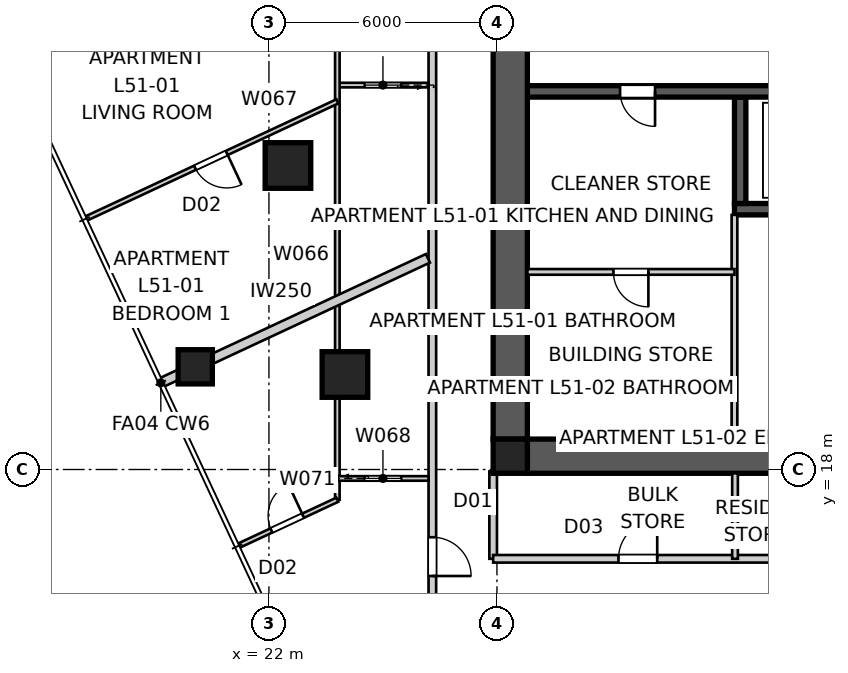
"""IFC4 building model, lengths in metres.
Left out: names, types, materials, properties, quantities, classifications, styles, units other than length and angle.
Written with IfcOpenShell. Run it as: python <this file> out.ifc"""

import sys

from ifc_helpers import new_model, si_unit, direction, frame, frame_2d, origin, origin_2d, place, context, subcontext, project, spatial, polyline, rectangle, outline, extrude, element, fill, save


model = new_model("IFC4")
c1 = context("Model", 3, precision=1e-05, world=origin(), true_north=direction((0.0, 1.0)))
c2 = subcontext(c1, "Body", "Model", "MODEL_VIEW")
j1 = project(units=[si_unit("LENGTHUNIT", "METRE"), si_unit("PLANEANGLEUNIT", "RADIAN")], contexts=[c1])
p1 = place(None, origin())
s1 = spatial("IfcSite", under=j1, at=p1, CompositionType="ELEMENT")
p2 = place(p1, origin())
s2 = spatial("IfcBuilding", under=s1, at=p2, CompositionType="ELEMENT")
p3 = place(p2, frame((0.0, 0.0, 186.2)))
s3 = spatial("IfcBuildingStorey", under=s2, at=p3, CompositionType="ELEMENT", Elevation=186.2)
p4 = place(p3, frame((51.2, 18.35, 0.0), z_axis=(0.0, 0.0, 1.0), x_axis=(-1.0, 0.0, 0.0)))
e1 = element("IfcWall", 1, at=p4, inside=s3, PredefinedType="SHEAR", context=c2, shape_type="SweptSolid", body=[
    extrude(outline(polyline([(0.0, -0.45), (22.4, -0.45), (22.4, -0.025), (22.85, -0.025), (22.85, 0.025), (22.4, 0.025), (22.4, 0.45), (0.0, 0.45), (0.0, 0.025), (-0.45, 0.025), (-0.45, -0.025), (0.0, -0.025), (0.0, -0.45)])), origin(), (0.0, 0.0, 1.0), 3.4),
])
p5 = place(p3, frame((28.35, 41.2, 0.0), z_axis=(0.0, 0.0, 1.0), x_axis=(0.0, -1.0, 0.0)))
e2 = element("IfcWall", 2, at=p5, inside=s3, PredefinedType="SHEAR", context=c2, shape_type="SweptSolid", body=[
    extrude(outline(polyline([(0.0, -0.45), (22.4, -0.45), (22.4, -0.025), (22.85, -0.025), (22.85, 0.025), (22.4, 0.025), (22.4, 0.45), (0.0, 0.45), (0.0, 0.025), (-0.45, 0.025), (-0.45, -0.025), (0.0, -0.025), (0.0, -0.45)])), origin(), (0.0, 0.0, 1.0), 3.4),
])
p6 = place(p5, frame((11.14, 0.0, 0.0)))
e3 = element("IfcOpeningElement", 3, at=p6, cuts=e2, PredefinedType="OPENING", context=c2, shape_type="SweptSolid", body=[
    extrude(rectangle(XDim=1.02, YDim=2.4, at=frame_2d((0.51, 1.2))), frame((0.0, 0.46, 0.0), z_axis=(0.0, -1.0, 0.0), x_axis=(1.0, 0.0, 0.0)), (0.0, 0.0, 1.0), 0.92),
])
p7 = place(p3, frame((51.2, 27.95, 0.0), z_axis=(0.0, 0.0, 1.0), x_axis=(-1.0, 0.0, 0.0)))
e4 = element("IfcWall", 4, at=p7, inside=s3, PredefinedType="SHEAR", context=c2, shape_type="SweptSolid", body=[
    extrude(rectangle(XDim=22.4, YDim=0.3, at=frame_2d((11.2, 0.0))), origin(), (0.0, 0.0, 1.0), 3.4),
])
p8 = place(p7, frame((19.04, 0.0, 0.0)))
e5 = element("IfcOpeningElement", 5, at=p8, cuts=e4, PredefinedType="OPENING", context=c2, shape_type="SweptSolid", body=[
    extrude(rectangle(XDim=0.92, YDim=2.1, at=frame_2d((0.46, 1.05))), frame((0.0, 0.16, 0.0), z_axis=(0.0, -1.0, 0.0), x_axis=(1.0, 0.0, 0.0)), (0.0, 0.0, 1.0), 0.32),
])
p9 = place(p7, frame((1.265, 0.0, 0.0)))
e6 = element("IfcOpeningElement", 6, at=p9, cuts=e4, PredefinedType="OPENING", context=c2, shape_type="SweptSolid", body=[
    extrude(rectangle(XDim=1.02, YDim=2.1, at=frame_2d((0.51, 1.05))), frame((0.0, 0.16, 0.0), z_axis=(0.0, -1.0, 0.0), x_axis=(1.0, 0.0, 0.0)), (0.0, 0.0, 1.0), 0.32),
])
p10 = place(p7, frame((4.015, 0.0, 0.0)))
e7 = element("IfcOpeningElement", 7, at=p10, cuts=e4, PredefinedType="OPENING", context=c2, shape_type="SweptSolid", body=[
    extrude(rectangle(XDim=0.92, YDim=2.1, at=frame_2d((0.46, 1.05))), frame((0.0, 0.16, 0.0), z_axis=(0.0, -1.0, 0.0), x_axis=(1.0, 0.0, 0.0)), (0.0, 0.0, 1.0), 0.32),
])
p11 = place(p7, frame((6.45, 0.0, 0.0)))
e8 = element("IfcOpeningElement", 8, at=p11, cuts=e4, PredefinedType="OPENING", context=c2, shape_type="SweptSolid", body=[
    extrude(rectangle(XDim=1.1, YDim=2.1, at=frame_2d((0.55, 1.05))), frame((0.0, 0.16, 0.0), z_axis=(0.0, -1.0, 0.0), x_axis=(1.0, 0.0, 0.0)), (0.0, 0.0, 1.0), 0.32),
])
p12 = place(p7, frame((9.25, 0.0, 0.0)))
e9 = element("IfcOpeningElement", 9, at=p12, cuts=e4, PredefinedType="OPENING", context=c2, shape_type="SweptSolid", body=[
    extrude(rectangle(XDim=1.1, YDim=2.1, at=frame_2d((0.55, 1.05))), frame((0.0, 0.16, 0.0), z_axis=(0.0, -1.0, 0.0), x_axis=(1.0, 0.0, 0.0)), (0.0, 0.0, 1.0), 0.32),
])
p13 = place(p7, frame((14.85, 0.0, 0.0)))
e10 = element("IfcOpeningElement", 10, at=p13, cuts=e4, PredefinedType="OPENING", context=c2, shape_type="SweptSolid", body=[
    extrude(rectangle(XDim=1.1, YDim=2.1, at=frame_2d((0.55, 1.05))), frame((0.0, 0.16, 0.0), z_axis=(0.0, -1.0, 0.0), x_axis=(1.0, 0.0, 0.0)), (0.0, 0.0, 1.0), 0.32),
])
p14 = place(p3, frame((45.75, 24.85, 0.0), z_axis=(0.0, 0.0, 1.0), x_axis=(-1.0, 0.0, 0.0)))
e11 = element("IfcWall", 11, at=p14, inside=s3, PredefinedType="SHEAR", context=c2, shape_type="SweptSolid", body=[
    extrude(rectangle(XDim=11.5, YDim=0.3, at=frame_2d((5.75, 0.0))), origin(), (0.0, 0.0, 1.0), 3.4),
])
p15 = place(p3, frame((34.4, 27.8, 0.0), z_axis=(0.0, 0.0, 1.0), x_axis=(0.0, -1.0, 0.0)))
e12 = element("IfcWall", 12, at=p15, inside=s3, PredefinedType="SHEAR", context=c2, shape_type="SweptSolid", body=[
    extrude(rectangle(XDim=2.8, YDim=0.3, at=frame_2d((1.4, 0.0))), origin(), (0.0, 0.0, 1.0), 3.4),
])
for number, where, z_axis, x_axis in (
    (13, (28.35, 18.35, 0.0), (0.0, 0.0, 1.0), (1.0, 0.0, 0.0)),
    (14, (20.061, 20.702, 0.0), (0.0, 0.0, 1.0), (1.0, 0.0, 0.0)),
):
    element("IfcColumn", number, at=place(p3, frame(where, z_axis=z_axis, x_axis=x_axis)), inside=s3, PredefinedType="COLUMN", context=c2, shape_type="SweptSolid", body=[
        extrude(rectangle(XDim=0.9, YDim=0.9, at=origin_2d()), origin(), (0.0, 0.0, 1.0), 3.4),
    ])
for number, where, z_axis, x_axis in (
    (15, (22.5, 26.0, 0.0), (0.0, 0.0, 1.0), (1.0, 0.0, 0.0)),
    (16, (24.0, 20.5, 0.0), (0.0, 0.0, 1.0), (1.0, 0.0, 0.0)),
):
    element("IfcColumn", number, at=place(p3, frame(where, z_axis=z_axis, x_axis=x_axis)), inside=s3, PredefinedType="COLUMN", context=c2, shape_type="SweptSolid", body=[
        extrude(rectangle(XDim=1.2, YDim=1.2, at=origin_2d()), origin(), (0.0, 0.0, 1.0), 3.4),
    ])
p16 = place(p3, frame((26.3, 47.1, 0.0), z_axis=(0.0, 0.0, 1.0), x_axis=(0.0, -1.0, 0.0)))
e17 = element("IfcWall", 17, at=p16, inside=s3, PredefinedType="PARTITIONING", context=c2, shape_type="SweptSolid", body=[
    extrude(rectangle(XDim=33.8, YDim=0.2, at=frame_2d((16.9, 0.0))), origin(), (0.0, 0.0, 1.0), 3.25),
])
p17 = place(p16, frame((15.449, 0.0, 0.0)))
e18 = element("IfcOpeningElement", 18, at=p17, cuts=e17, PredefinedType="OPENING", context=c2, shape_type="SweptSolid", body=[
    extrude(rectangle(XDim=1.02, YDim=2.34, at=frame_2d((0.51, 1.17))), frame((0.0, 0.11, 0.0), z_axis=(0.0, -1.0, 0.0), x_axis=(1.0, 0.0, 0.0)), (0.0, 0.0, 1.0), 0.22),
])
p18 = place(p16, frame((30.883, 0.0, 0.0)))
e19 = element("IfcOpeningElement", 19, at=p18, cuts=e17, PredefinedType="OPENING", context=c2, shape_type="SweptSolid", body=[
    extrude(rectangle(XDim=1.02, YDim=2.34, at=frame_2d((0.51, 1.17))), frame((0.0, 0.11, 0.0), z_axis=(0.0, -1.0, 0.0), x_axis=(1.0, 0.0, 0.0)), (0.0, 0.0, 1.0), 0.22),
])
p19 = place(p3, frame((19.155, 20.28, 0.0), z_axis=(0.0, 0.0, 1.0), x_axis=(0.906308569177, 0.422616584432, 0.0)))
e20 = element("IfcWall", 20, at=p19, inside=s3, PredefinedType="PARTITIONING", context=c2, shape_type="SweptSolid", body=[
    extrude(rectangle(XDim=7.755, YDim=0.25, at=frame_2d((3.877, 0.0))), origin(), (0.0, 0.0, 1.0), 3.25),
])
p20 = place(p3, frame((15.14, 28.89, 0.0), z_axis=(0.0, 0.0, 1.0), x_axis=(0.906303906082, 0.422626584374, 0.0)))
e21 = element("IfcWall", 21, at=p20, inside=s3, PredefinedType="PARTITIONING", context=c2, shape_type="SweptSolid", body=[
    extrude(rectangle(XDim=12.185, YDim=0.25, at=frame_2d((6.092, 0.0))), origin(), (0.0, 0.0, 1.0), 3.25),
])
p21 = place(p3, frame((34.25, 18.8, 0.0), z_axis=(0.0, 0.0, 1.0), x_axis=(0.0, 1.0, 0.0)))
e22 = element("IfcWall", 22, at=p21, inside=s3, PredefinedType="SOLIDWALL", context=c2, shape_type="SweptSolid", body=[
    extrude(rectangle(XDim=5.9, YDim=0.15, at=frame_2d((2.95, 0.0))), origin(), (0.0, 0.0, 1.0), 3.25),
])
p22 = place(p3, frame((34.25, 23.2, 0.0), z_axis=(0.0, 0.0, 1.0), x_axis=(-1.0, 0.0, 0.0)))
e23 = element("IfcWall", 23, at=p22, inside=s3, PredefinedType="SOLIDWALL", context=c2, shape_type="SweptSolid", body=[
    extrude(rectangle(XDim=5.45, YDim=0.15, at=frame_2d((2.725, 0.0))), origin(), (0.0, 0.0, 1.0), 3.25),
])
p23 = place(p22, frame((2.265, 0.0, 0.0)))
e24 = element("IfcOpeningElement", 24, at=p23, cuts=e23, PredefinedType="OPENING", context=c2, shape_type="SweptSolid", body=[
    extrude(rectangle(XDim=0.92, YDim=2.1, at=frame_2d((0.46, 1.05))), frame((0.0, 0.085, 0.0), z_axis=(0.0, -1.0, 0.0), x_axis=(1.0, 0.0, 0.0)), (0.0, 0.0, 1.0), 0.17),
])
p24 = place(p3, frame((27.9, 17.95, 0.0), z_axis=(0.0, 0.0, 1.0), x_axis=(0.0, -1.0, 0.0)))
e25 = element("IfcWall", 25, at=p24, inside=s3, PredefinedType="PARTITIONING", context=c2, shape_type="SweptSolid", body=[
    extrude(rectangle(XDim=2.3, YDim=0.2, at=frame_2d((1.15, 0.0))), origin(), (0.0, 0.0, 1.0), 3.25),
])
p25 = place(p3, frame((27.9, 15.65, 0.0), z_axis=(0.0, 0.0, 1.0), x_axis=(1.0, 0.0, 0.0)))
e26 = element("IfcWall", 26, at=p25, inside=s3, PredefinedType="PARTITIONING", context=c2, shape_type="SweptSolid", body=[
    extrude(rectangle(XDim=24.2, YDim=0.2, at=frame_2d((12.1, 0.0))), origin(), (0.0, 0.0, 1.0), 3.25),
])
p26 = place(p25, frame((10.743, 0.0, 0.0)))
e27 = element("IfcOpeningElement", 27, at=p26, cuts=e26, PredefinedType="OPENING", context=c2, shape_type="SweptSolid", body=[
    extrude(rectangle(XDim=1.02, YDim=2.1, at=frame_2d((0.51, 1.05))), frame((0.0, 0.11, 0.0), z_axis=(0.0, -1.0, 0.0), x_axis=(1.0, 0.0, 0.0)), (0.0, 0.0, 1.0), 0.22),
])
p27 = place(p25, frame((19.636, 0.0, 0.0)))
e28 = element("IfcOpeningElement", 28, at=p27, cuts=e26, PredefinedType="OPENING", context=c2, shape_type="SweptSolid", body=[
    extrude(rectangle(XDim=1.02, YDim=2.1, at=frame_2d((0.51, 1.05))), frame((0.0, 0.11, 0.0), z_axis=(0.0, -1.0, 0.0), x_axis=(1.0, 0.0, 0.0)), (0.0, 0.0, 1.0), 0.22),
])
p28 = place(p25, frame((3.297, 0.0, 0.0)))
e29 = element("IfcOpeningElement", 29, at=p28, cuts=e26, PredefinedType="OPENING", context=c2, shape_type="SweptSolid", body=[
    extrude(rectangle(XDim=1.02, YDim=2.1, at=frame_2d((0.51, 1.05))), frame((0.0, 0.11, 0.0), z_axis=(0.0, -1.0, 0.0), x_axis=(1.0, 0.0, 0.0)), (0.0, 0.0, 1.0), 0.22),
])
p29 = place(p3, frame((34.265, 15.65, 0.0), z_axis=(0.0, 0.0, 1.0), x_axis=(0.0, 1.0, 0.0)))
e30 = element("IfcWall", 30, at=p29, inside=s3, PredefinedType="SOLIDWALL", context=c2, shape_type="SweptSolid", body=[
    extrude(rectangle(XDim=2.25, YDim=0.15, at=frame_2d((1.125, 0.0))), origin(), (0.0, 0.0, 1.0), 2.796),
])
p30 = place(p3, frame((26.2, 28.116, 0.0), z_axis=(0.0, 0.0, 1.0), x_axis=(-1.0, 0.0, 0.0)))
e31 = element("IfcWall", 31, at=p30, inside=s3, PredefinedType="PARTITIONING", context=c2, shape_type="SweptSolid", body=[
    extrude(rectangle(XDim=2.4, YDim=0.12, at=frame_2d((1.2, 0.0))), origin(), (0.0, 0.0, 1.0), 3.25),
])
p31 = place(p30, frame((0.72, 0.0, 0.0)))
e32 = element("IfcOpeningElement", 32, at=p31, cuts=e31, PredefinedType="OPENING", context=c2, shape_type="SweptSolid", body=[
    extrude(rectangle(XDim=0.96, YDim=2.1, at=frame_2d((0.48, 1.05))), frame((0.0, 0.07, 0.0), z_axis=(0.0, -1.0, 0.0), x_axis=(1.0, 0.0, 0.0)), (0.0, 0.0, 1.0), 0.14),
])
p32 = place(p3, frame((23.8, 17.205, 0.0), z_axis=(0.0, 0.0, 1.0), x_axis=(0.0, 1.0, 0.0)))
e33 = element("IfcWall", 33, at=p32, inside=s3, PredefinedType="PARTITIONING", context=c2, shape_type="SweptSolid", body=[
    extrude(rectangle(XDim=30.574, YDim=0.12, at=frame_2d((15.287, 0.0))), origin(), (0.0, 0.0, 1.0), 2.55),
])
p33 = place(p32, frame((12.857, 0.0, 0.0)))
e34 = element("IfcOpeningElement", 34, at=p33, cuts=e33, PredefinedType="OPENING", context=c2, shape_type="SweptSolid", body=[
    extrude(rectangle(XDim=0.92, YDim=2.34, at=frame_2d((0.46, 1.17))), frame((0.0, 0.07, 0.0), z_axis=(0.0, -1.0, 0.0), x_axis=(1.0, 0.0, 0.0)), (0.0, 0.0, 1.0), 0.14),
])
p34 = place(p32, frame((28.042, 0.0, 0.0)))
e35 = element("IfcOpeningElement", 35, at=p34, cuts=e33, PredefinedType="OPENING", context=c2, shape_type="SweptSolid", body=[
    extrude(rectangle(XDim=0.92, YDim=2.34, at=frame_2d((0.46, 1.17))), frame((0.0, 0.07, 0.0), z_axis=(0.0, -1.0, 0.0), x_axis=(1.0, 0.0, 0.0)), (0.0, 0.0, 1.0), 0.14),
])
p35 = place(p32, frame((20.655, 0.0, 0.0)))
e36 = element("IfcOpeningElement", 36, at=p35, cuts=e33, PredefinedType="OPENING", context=c2, shape_type="SweptSolid", body=[
    extrude(rectangle(XDim=0.96, YDim=2.1, at=frame_2d((0.48, 1.05))), frame((0.0, 0.07, 0.0), z_axis=(0.0, -1.0, 0.0), x_axis=(1.0, 0.0, 0.0)), (0.0, 0.0, 1.0), 0.14),
])
p36 = place(p3, frame((23.8, 27.687, 0.0), z_axis=(0.0, 0.0, 1.0), x_axis=(-0.906306986906, -0.422619977621, 0.0)))
e37 = element("IfcWall", 37, at=p36, inside=s3, PredefinedType="PARTITIONING", context=c2, shape_type="SweptSolid", body=[
    extrude(rectangle(XDim=7.3, YDim=0.12, at=frame_2d((3.65, 0.0))), origin(), (0.0, 0.0, 1.0), 3.25),
])
p37 = place(p36, frame((3.21, 0.0, 0.0)))
e38 = element("IfcOpeningElement", 38, at=p37, cuts=e37, PredefinedType="OPENING", context=c2, shape_type="SweptSolid", body=[
    extrude(rectangle(XDim=0.92, YDim=2.34, at=frame_2d((0.46, 1.17))), frame((0.0, 0.07, 0.0), z_axis=(0.0, -1.0, 0.0), x_axis=(1.0, 0.0, 0.0)), (0.0, 0.0, 1.0), 0.14),
])
p38 = place(p3, frame((23.8, 17.765, 0.0), z_axis=(0.0, 0.0, 1.0), x_axis=(1.0, 0.0, 0.0)))
e39 = element("IfcWall", 39, at=p38, inside=s3, PredefinedType="PARTITIONING", context=c2, shape_type="SweptSolid", body=[
    extrude(rectangle(XDim=2.4, YDim=0.12, at=frame_2d((1.2, 0.0))), origin(), (0.0, 0.0, 1.0), 3.25),
])
p39 = place(p38, frame((0.72, 0.0, 0.0)))
e40 = element("IfcOpeningElement", 40, at=p39, cuts=e39, PredefinedType="OPENING", context=c2, shape_type="SweptSolid", body=[
    extrude(rectangle(XDim=0.96, YDim=2.1, at=frame_2d((0.48, 1.05))), frame((0.0, 0.07, 0.0), z_axis=(0.0, -1.0, 0.0), x_axis=(1.0, 0.0, 0.0)), (0.0, 0.0, 1.0), 0.14),
])
p40 = place(p3, frame((21.199, 15.992, 0.0), z_axis=(0.0, 0.0, 1.0), x_axis=(0.906291760669, 0.422652628697, 0.0)))
e41 = element("IfcWall", 41, at=p40, inside=s3, PredefinedType="PARTITIONING", context=c2, shape_type="SweptSolid", body=[
    extrude(rectangle(XDim=2.87, YDim=0.12, at=frame_2d((1.435, 0.0))), origin(), (0.0, 0.0, 1.0), 3.25),
])
p41 = place(p40, frame((0.955, 0.0, 0.0)))
e42 = element("IfcOpeningElement", 42, at=p41, cuts=e41, PredefinedType="OPENING", context=c2, shape_type="SweptSolid", body=[
    extrude(rectangle(XDim=0.92, YDim=2.34, at=frame_2d((0.46, 1.17))), frame((0.0, 0.07, 0.0), z_axis=(0.0, -1.0, 0.0), x_axis=(1.0, 0.0, 0.0)), (0.0, 0.0, 1.0), 0.14),
])
p42 = place(p8, origin())
e43 = element("IfcDoor", 43, at=p42, inside=s3, OperationType="SINGLE_SWING_LEFT", PredefinedType="DOOR", context=c2, shape_type="SweptSolid", body=[
    extrude(rectangle(XDim=0.92, YDim=2.1, at=frame_2d((0.46, 1.05))), frame((0.0, 0.025, 0.0), z_axis=(0.0, -1.0, 0.0), x_axis=(1.0, 0.0, 0.0)), (0.0, 0.0, 1.0), 0.05),
])
fill(e5, e43)
p43 = place(p28, origin())
e44 = element("IfcDoor", 44, at=p43, inside=s3, OperationType="SINGLE_SWING_RIGHT", PredefinedType="DOOR", context=c2, shape_type="SweptSolid", body=[
    extrude(rectangle(XDim=1.02, YDim=2.1, at=frame_2d((0.51, 1.05))), frame((0.0, 0.025, 0.0), z_axis=(0.0, -1.0, 0.0), x_axis=(1.0, 0.0, 0.0)), (0.0, 0.0, 1.0), 0.05),
])
fill(e29, e44)
p44 = place(p18, origin())
e45 = element("IfcDoor", 45, at=p44, inside=s3, OperationType="SINGLE_SWING_RIGHT", PredefinedType="DOOR", context=c2, shape_type="SweptSolid", body=[
    extrude(rectangle(XDim=1.02, YDim=2.34, at=frame_2d((0.51, 1.17))), frame((0.0, 0.025, 0.0), z_axis=(0.0, -1.0, 0.0), x_axis=(1.0, 0.0, 0.0)), (0.0, 0.0, 1.0), 0.05),
])
fill(e19, e45)
p45 = place(p23, origin())
e46 = element("IfcDoor", 46, at=p45, inside=s3, OperationType="SINGLE_SWING_LEFT", PredefinedType="DOOR", context=c2, shape_type="SweptSolid", body=[
    extrude(rectangle(XDim=0.92, YDim=2.1, at=frame_2d((0.46, 1.05))), frame((0.0, 0.025, 0.0), z_axis=(0.0, -1.0, 0.0), x_axis=(1.0, 0.0, 0.0)), (0.0, 0.0, 1.0), 0.05),
])
fill(e24, e46)
p46 = place(p31, origin())
e47 = element("IfcDoor", 47, at=p46, inside=s3, OperationType="SLIDING_TO_LEFT", PredefinedType="DOOR", context=c2, shape_type="SweptSolid", body=[
    extrude(rectangle(XDim=0.96, YDim=2.1, at=frame_2d((0.48, 1.05))), frame((0.0, 0.025, 0.0), z_axis=(0.0, -1.0, 0.0), x_axis=(1.0, 0.0, 0.0)), (0.0, 0.0, 1.0), 0.05),
])
fill(e32, e47)
p47 = place(p41, origin())
e48 = element("IfcDoor", 48, at=p47, inside=s3, OperationType="SINGLE_SWING_RIGHT", PredefinedType="DOOR", context=c2, shape_type="SweptSolid", body=[
    extrude(rectangle(XDim=0.92, YDim=2.34, at=frame_2d((0.46, 1.17))), frame((0.0, 0.025, 0.0), z_axis=(0.0, -1.0, 0.0), x_axis=(1.0, 0.0, 0.0)), (0.0, 0.0, 1.0), 0.05),
])
fill(e42, e48)
p48 = place(p39, origin())
e49 = element("IfcDoor", 49, at=p48, inside=s3, OperationType="SLIDING_TO_LEFT", PredefinedType="DOOR", context=c2, shape_type="SweptSolid", body=[
    extrude(rectangle(XDim=0.96, YDim=2.1, at=frame_2d((0.48, 1.05))), frame((0.0, 0.025, 0.0), z_axis=(0.0, -1.0, 0.0), x_axis=(1.0, 0.0, 0.0)), (0.0, 0.0, 1.0), 0.05),
])
fill(e40, e49)
p49 = place(p37, origin())
e50 = element("IfcDoor", 50, at=p49, inside=s3, OperationType="SINGLE_SWING_LEFT", PredefinedType="DOOR", context=c2, shape_type="SweptSolid", body=[
    extrude(rectangle(XDim=0.92, YDim=2.34, at=frame_2d((0.46, 1.17))), frame((0.0, 0.025, 0.0), z_axis=(0.0, -1.0, 0.0), x_axis=(1.0, 0.0, 0.0)), (0.0, 0.0, 1.0), 0.05),
])
fill(e38, e50)
save(model, sys.argv[1])
